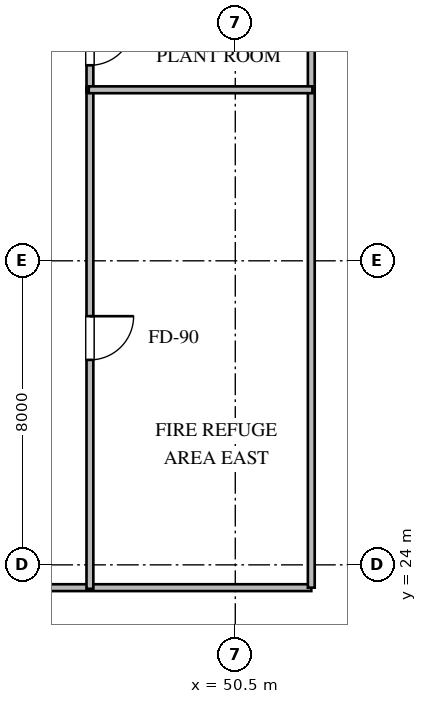
"""IFC4 building model, lengths in metres.
Left out: names, types, materials, properties, quantities, classifications, styles, units other than length and angle.
Written with IfcOpenShell. Run it as: python <this file> out.ifc"""

import sys

from ifc_helpers import new_model, si_unit, direction, frame, frame_2d, origin, place, context, subcontext, project, spatial, rectangle, extrude, element, fill, save


model = new_model("IFC4")
c1 = context("Model", 3, precision=1e-05, world=origin(), true_north=direction((0.0, 1.0)))
c2 = subcontext(c1, "Body", "Model", "MODEL_VIEW")
j1 = project(units=[si_unit("LENGTHUNIT", "METRE"), si_unit("PLANEANGLEUNIT", "RADIAN")], contexts=[c1])
p1 = place(None, origin())
s1 = spatial("IfcSite", under=j1, at=p1, CompositionType="ELEMENT")
p2 = place(p1, origin())
s2 = spatial("IfcBuilding", under=s1, at=p2, CompositionType="ELEMENT")
p3 = place(p2, frame((0.0, 0.0, 181.8)))
s3 = spatial("IfcBuildingStorey", under=s2, at=p3, CompositionType="ELEMENT", Elevation=181.8)
p4 = place(p3, frame((44.275, 23.4, 0.0), z_axis=(0.0, 0.0, 1.0), x_axis=(1.0, 0.0, 0.0)))
e1 = element("IfcWall", 1, at=p4, inside=s3, PredefinedType="PARTITIONING", context=c2, shape_type="SweptSolid", body=[
    extrude(rectangle(XDim=8.225, YDim=0.18, at=frame_2d((4.113, 0.0))), origin(), (0.0, 0.0, 1.0), 3.65),
])
p5 = place(p3, frame((52.5, 23.4, 0.0), z_axis=(0.0, 0.0, 1.0), x_axis=(0.0, 1.0, 0.0)))
e2 = element("IfcWall", 2, at=p5, inside=s3, PredefinedType="PARTITIONING", context=c2, shape_type="SweptSolid", body=[
    extrude(rectangle(XDim=19.8, YDim=0.18, at=frame_2d((9.9, 0.0))), origin(), (0.0, 0.0, 1.0), 5.16),
])
p6 = place(p3, frame((46.675, 36.565, 0.0), z_axis=(0.0, 0.0, 1.0), x_axis=(0.0, -1.0, 0.0)))
e3 = element("IfcWall", 3, at=p6, inside=s3, PredefinedType="PARTITIONING", context=c2, shape_type="SweptSolid", body=[
    extrude(rectangle(XDim=13.195, YDim=0.18, at=frame_2d((6.597, 0.0))), origin(), (0.0, 0.0, 1.0), 5.16),
])
p7 = place(p6, frame((6.022, 0.0, 0.0)))
e4 = element("IfcOpeningElement", 4, at=p7, cuts=e3, PredefinedType="OPENING", context=c2, shape_type="SweptSolid", body=[
    extrude(rectangle(XDim=1.15, YDim=2.1, at=frame_2d((0.575, 1.05))), frame((0.0, 0.1, 0.0), z_axis=(0.0, -1.0, 0.0), x_axis=(1.0, 0.0, 0.0)), (0.0, 0.0, 1.0), 0.2),
])
p8 = place(p3, frame((46.675, 39.005, 0.0), z_axis=(0.0, 0.0, 1.0), x_axis=(0.0, -1.0, 0.0)))
e5 = element("IfcWall", 5, at=p8, inside=s3, PredefinedType="PARTITIONING", context=c2, shape_type="SweptSolid", body=[
    extrude(rectangle(XDim=2.57, YDim=0.18, at=frame_2d((1.285, 0.0))), origin(), (0.0, 0.0, 1.0), 5.16),
])
p9 = place(p8, frame((0.71, 0.0, 0.0)))
e6 = element("IfcOpeningElement", 6, at=p9, cuts=e5, PredefinedType="OPENING", context=c2, shape_type="SweptSolid", body=[
    extrude(rectangle(XDim=1.15, YDim=2.1, at=frame_2d((0.575, 1.05))), frame((0.0, 0.1, 0.0), z_axis=(0.0, -1.0, 0.0), x_axis=(1.0, 0.0, 0.0)), (0.0, 0.0, 1.0), 0.2),
])
p10 = place(p3, frame((46.645, 36.5, 0.0), z_axis=(0.0, 0.0, 1.0), x_axis=(1.0, 0.0, 0.0)))
e7 = element("IfcWall", 7, at=p10, inside=s3, PredefinedType="PARTITIONING", context=c2, shape_type="SweptSolid", body=[
    extrude(rectangle(XDim=5.885, YDim=0.18, at=frame_2d((2.942, 0.0))), origin(), (0.0, 0.0, 1.0), 3.65),
])
p11 = place(p7, origin())
e8 = element("IfcDoor", 8, at=p11, inside=s3, OperationType="SINGLE_SWING_LEFT", PredefinedType="DOOR", context=c2, shape_type="SweptSolid", body=[
    extrude(rectangle(XDim=1.15, YDim=2.1, at=frame_2d((0.575, 1.05))), frame((0.0, 0.025, 0.0), z_axis=(0.0, -1.0, 0.0), x_axis=(1.0, 0.0, 0.0)), (0.0, 0.0, 1.0), 0.05),
])
fill(e4, e8)
p12 = place(p9, origin())
e9 = element("IfcDoor", 9, at=p12, inside=s3, OperationType="SINGLE_SWING_LEFT", PredefinedType="DOOR", context=c2, shape_type="SweptSolid", body=[
    extrude(rectangle(XDim=1.15, YDim=2.1, at=frame_2d((0.575, 1.05))), frame((0.0, 0.025, 0.0), z_axis=(0.0, -1.0, 0.0), x_axis=(1.0, 0.0, 0.0)), (0.0, 0.0, 1.0), 0.05),
])
fill(e6, e9)
save(model, sys.argv[1])
